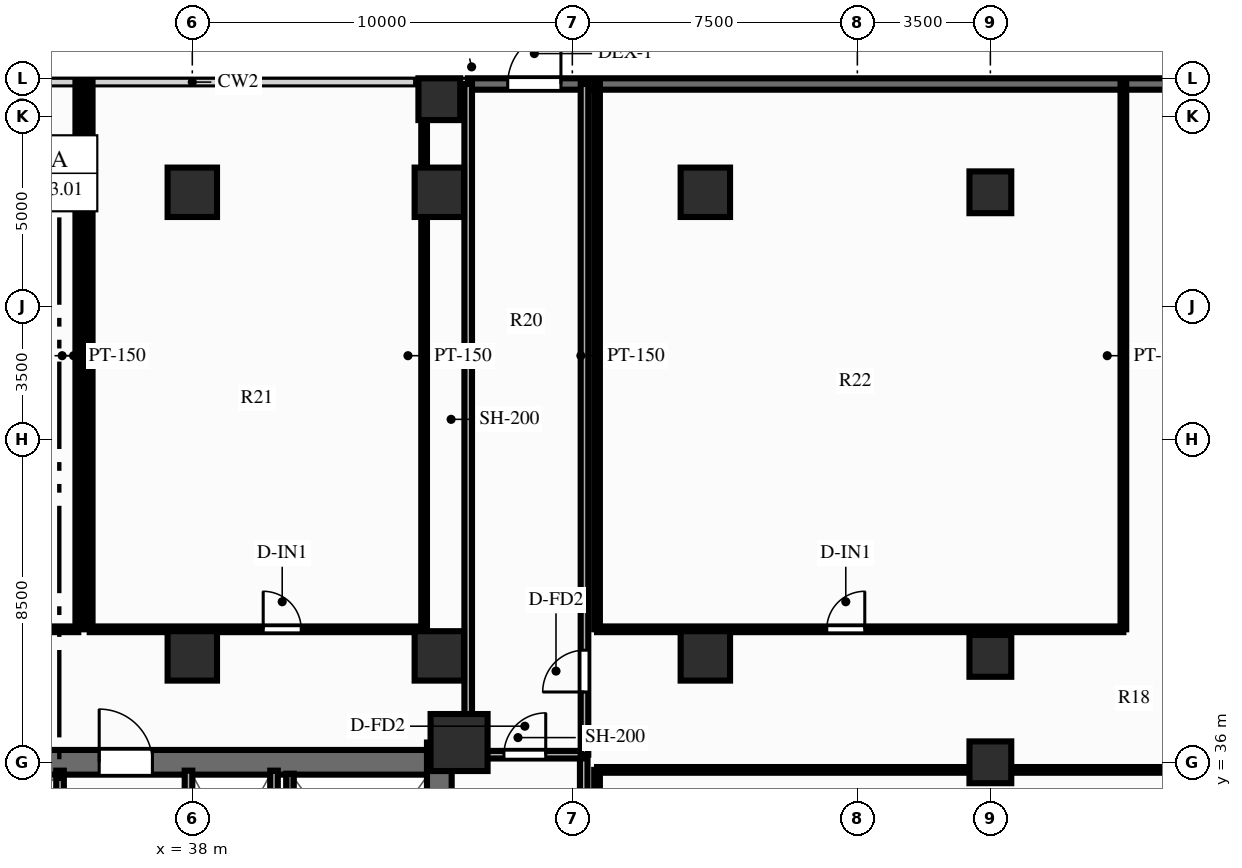
"""IFC4 building model, lengths in metres.
Left out: names, types, materials, properties, quantities, classifications, styles, units other than length and angle.
Written with IfcOpenShell. Run it as: python <this file> out.ifc"""

import sys

from ifc_helpers import new_model, si_unit, direction, frame, frame_2d, origin, origin_2d, place, context, subcontext, project, spatial, rectangle, extrude, source, transform, mapped, element, fill, save


model = new_model("IFC4")
c1 = context("Model", 3, precision=1e-05, world=origin(), true_north=direction((0.0, 1.0)))
c2 = subcontext(c1, "Body", "Model", "MODEL_VIEW")
j1 = project(units=[si_unit("LENGTHUNIT", "METRE"), si_unit("PLANEANGLEUNIT", "RADIAN")], contexts=[c1])
p1 = place(None, origin())
s1 = spatial("IfcSite", under=j1, at=p1, CompositionType="ELEMENT")
p2 = place(p1, origin())
s2 = spatial("IfcBuilding", under=s1, at=p2, CompositionType="ELEMENT")
p3 = place(p2, origin())
s3 = spatial("IfcBuildingStorey", under=s2, at=p3, CompositionType="ELEMENT", Elevation=0.0)
p4 = place(p3, frame((44.5, 17.48, 0.0), z_axis=(0.0, 0.0, 1.0), x_axis=(0.0, 1.0, 0.0)))
e1 = element("IfcWall", 1, at=p4, inside=s3, PredefinedType="SHEAR", context=c2, shape_type="SweptSolid", body=[
    extrude(rectangle(XDim=19.04, YDim=0.65, at=frame_2d((9.52, 0.0))), origin(), (0.0, 0.0, 1.0), 4.2),
])
p5 = place(p4, frame((12.67, 0.0, 0.0), z_axis=(0.0, 0.0, 1.0), x_axis=(-1.0, 0.0, 0.0)))
e2 = element("IfcOpeningElement", 2, at=p5, cuts=e1, PredefinedType="OPENING", context=c2, shape_type="SweptSolid", body=[
    extrude(rectangle(XDim=1.1, YDim=2.15, at=frame_2d((0.55, 1.075))), frame((0.0, 0.337, 0.0), z_axis=(0.0, -1.0, 0.0), x_axis=(1.0, 0.0, 0.0)), (0.0, 0.0, 1.0), 0.674),
])
p6 = place(p3, frame((31.825, 36.0, 0.0), z_axis=(0.0, 0.0, 1.0), x_axis=(1.0, 0.0, 0.0)))
e3 = element("IfcWall", 3, at=p6, inside=s3, PredefinedType="SHEAR", context=c2, shape_type="SweptSolid", body=[
    extrude(rectangle(XDim=12.35, YDim=0.65, at=frame_2d((6.175, 0.0))), origin(), (0.0, 0.0, 1.0), 4.2),
])
p7 = place(p6, frame((5.125, 0.0, 0.0), z_axis=(0.0, 0.0, 1.0), x_axis=(-1.0, 0.0, 0.0)))
e4 = element("IfcOpeningElement", 4, at=p7, cuts=e3, PredefinedType="OPENING", context=c2, shape_type="SweptSolid", body=[
    extrude(rectangle(XDim=1.4, YDim=2.15, at=frame_2d((0.7, 1.075))), frame((0.0, 0.337, 0.0), z_axis=(0.0, -1.0, 0.0), x_axis=(1.0, 0.0, 0.0)), (0.0, 0.0, 1.0), 0.674),
])
m1 = source(origin(), c2, "Body", "SweptSolid", [
    extrude(rectangle(XDim=1.5, YDim=1.5, at=origin_2d()), origin(), (0.0, 0.0, 1.0), 4.2),
])
p8 = place(p3, frame((45.02, 36.52, 0.0), z_axis=(0.0, 0.0, 1.0), x_axis=(1.0, 0.0, 0.0)))
e5 = element("IfcColumn", 5, at=p8, inside=s3, PredefinedType="COLUMN", context=c2, shape_type="MappedRepresentation", body=[
    mapped(m1, transform((0.0, 0.0, 0.0), scale=1.0)),
])
m2 = source(origin(), c2, "Body", "SweptSolid", [
    extrude(rectangle(XDim=1.1, YDim=1.1, at=origin_2d()), origin(), (0.0, 0.0, 1.0), 4.2),
])
for number, where, z_axis, x_axis in (
    (6, (59.0, 36.0, 0.0), (0.0, 0.0, 1.0), (1.0, 0.0, 0.0)),
    (7, (59.0, 38.8, 0.0), (0.0, 0.0, 1.0), (1.0, 0.0, 0.0)),
    (8, (59.0, 51.0, 0.0), (0.0, 0.0, 1.0), (1.0, 0.0, 0.0)),
):
    element("IfcColumn", number, at=place(p3, frame(where, z_axis=z_axis, x_axis=x_axis)), inside=s3, PredefinedType="COLUMN", context=c2, shape_type="MappedRepresentation", body=[
        mapped(m2, transform((0.0, 0.0, 0.0), scale=1.0)),
    ])
m3 = source(origin(), c2, "Body", "SweptSolid", [
    extrude(rectangle(XDim=1.3, YDim=1.3, at=origin_2d()), origin(), (0.0, 0.0, 1.0), 4.2),
])
for number, where, z_axis, x_axis in (
    (9, (38.0, 38.8, 0.0), (0.0, 0.0, 1.0), (1.0, 0.0, 0.0)),
    (10, (38.0, 51.0, 0.0), (0.0, 0.0, 1.0), (1.0, 0.0, 0.0)),
    (11, (44.5, 38.8, 0.0), (0.0, 0.0, 1.0), (1.0, 0.0, 0.0)),
    (12, (44.5, 51.0, 0.0), (0.0, 0.0, 1.0), (1.0, 0.0, 0.0)),
):
    element("IfcColumn", number, at=place(p3, frame(where, z_axis=z_axis, x_axis=x_axis)), inside=s3, PredefinedType="COLUMN", context=c2, shape_type="MappedRepresentation", body=[
        mapped(m3, transform((0.0, 0.0, 0.0), scale=1.0)),
    ])
p9 = place(p3, frame((44.5, 53.45, 0.0), z_axis=(0.0, 0.0, 1.0), x_axis=(1.0, 0.0, 0.0)))
e13 = element("IfcColumn", 13, at=p9, inside=s3, PredefinedType="COLUMN", context=c2, shape_type="MappedRepresentation", body=[
    mapped(m2, transform((0.0, 0.0, 0.0), scale=1.0)),
])
for number, where, z_axis, x_axis in (
    (14, (51.5, 38.8, 0.0), (0.0, 0.0, 1.0), (1.0, 0.0, 0.0)),
    (15, (51.5, 51.0, 0.0), (0.0, 0.0, 1.0), (1.0, 0.0, 0.0)),
):
    element("IfcColumn", number, at=place(p3, frame(where, z_axis=z_axis, x_axis=x_axis)), inside=s3, PredefinedType="COLUMN", context=c2, shape_type="MappedRepresentation", body=[
        mapped(m3, transform((0.0, 0.0, 0.0), scale=1.0)),
    ])
p10 = place(p3, frame((45.25, 53.85, 0.0), z_axis=(0.0, 0.0, 1.0), x_axis=(1.0, 0.0, 0.0)))
e16 = element("IfcWall", 16, at=p10, inside=s3, PredefinedType="SOLIDWALL", context=c2, shape_type="SweptSolid", body=[
    extrude(rectangle(XDim=30.75, YDim=0.3, at=frame_2d((15.375, 0.0))), origin(), (0.0, 0.0, 1.0), 3.48),
])
p11 = place(p10, frame((1.05, 0.0, 0.0)))
e17 = element("IfcOpeningElement", 17, at=p11, cuts=e16, PredefinedType="OPENING", context=c2, shape_type="SweptSolid", body=[
    extrude(rectangle(XDim=1.4, YDim=2.2, at=frame_2d((0.7, 1.1))), frame((0.0, 0.162, 0.0), z_axis=(0.0, -1.0, 0.0), x_axis=(1.0, 0.0, 0.0)), (0.0, 0.0, 1.0), 0.324),
])
p12 = place(p3, frame((40.15, 31.8, 0.0), z_axis=(0.0, 0.0, 1.0), x_axis=(0.0, 1.0, 0.0)))
e18 = element("IfcWall", 18, at=p12, inside=s3, PredefinedType="PARTITIONING", context=c2, shape_type="SweptSolid", body=[
    extrude(rectangle(XDim=3.98, YDim=0.2, at=frame_2d((1.99, 0.0))), origin(), (0.0, 0.0, 1.0), 3.92),
])
p13 = place(p3, frame((40.57, 28.65, 0.0), z_axis=(0.0, 0.0, 1.0), x_axis=(0.0, 1.0, 0.0)))
e19 = element("IfcWall", 19, at=p13, inside=s3, PredefinedType="SOLIDWALL", context=c2, shape_type="SweptSolid", body=[
    extrude(rectangle(XDim=7.05, YDim=0.2, at=frame_2d((3.525, 0.0))), origin(), (0.0, 0.0, 1.0), 3.92),
])
p14 = place(p3, frame((34.52, 25.44, 0.0), z_axis=(0.0, 0.0, 1.0), x_axis=(0.0, 1.0, 0.0)))
e20 = element("IfcWall", 20, at=p14, inside=s3, PredefinedType="PARTITIONING", context=c2, shape_type="SweptSolid", body=[
    extrude(rectangle(XDim=10.34, YDim=0.2, at=frame_2d((5.17, 0.0))), origin(), (0.0, 0.0, 1.0), 3.92),
])
p15 = place(p14, frame((0.32, 0.0, 0.0)))
e21 = element("IfcOpeningElement", 21, at=p15, cuts=e20, PredefinedType="OPENING", context=c2, shape_type="SweptSolid", body=[
    extrude(rectangle(XDim=1.0, YDim=2.15, at=frame_2d((0.5, 1.075))), frame((0.0, 0.112, 0.0), z_axis=(0.0, -1.0, 0.0), x_axis=(1.0, 0.0, 0.0)), (0.0, 0.0, 1.0), 0.224),
])
p16 = place(p14, frame((1.71, 0.0, 0.0)))
e22 = element("IfcOpeningElement", 22, at=p16, cuts=e20, PredefinedType="OPENING", context=c2, shape_type="SweptSolid", body=[
    extrude(rectangle(XDim=1.0, YDim=2.15, at=frame_2d((0.5, 1.075))), frame((0.0, 0.112, 0.0), z_axis=(0.0, -1.0, 0.0), x_axis=(1.0, 0.0, 0.0)), (0.0, 0.0, 1.0), 0.224),
])
p17 = place(p14, frame((3.535, 0.0, 0.0)))
e23 = element("IfcOpeningElement", 23, at=p17, cuts=e20, PredefinedType="OPENING", context=c2, shape_type="SweptSolid", body=[
    extrude(rectangle(XDim=1.0, YDim=2.15, at=frame_2d((0.5, 1.075))), frame((0.0, 0.112, 0.0), z_axis=(0.0, -1.0, 0.0), x_axis=(1.0, 0.0, 0.0)), (0.0, 0.0, 1.0), 0.224),
])
p18 = place(p14, frame((5.135, 0.0, 0.0)))
e24 = element("IfcOpeningElement", 24, at=p18, cuts=e20, PredefinedType="OPENING", context=c2, shape_type="SweptSolid", body=[
    extrude(rectangle(XDim=1.0, YDim=2.15, at=frame_2d((0.5, 1.075))), frame((0.0, 0.112, 0.0), z_axis=(0.0, -1.0, 0.0), x_axis=(1.0, 0.0, 0.0)), (0.0, 0.0, 1.0), 0.224),
])
p19 = place(p14, frame((7.01, 0.0, 0.0)))
e25 = element("IfcOpeningElement", 25, at=p19, cuts=e20, PredefinedType="OPENING", context=c2, shape_type="SweptSolid", body=[
    extrude(rectangle(XDim=1.0, YDim=2.15, at=frame_2d((0.5, 1.075))), frame((0.0, 0.112, 0.0), z_axis=(0.0, -1.0, 0.0), x_axis=(1.0, 0.0, 0.0)), (0.0, 0.0, 1.0), 0.224),
])
p20 = place(p14, frame((8.76, 0.0, 0.0)))
e26 = element("IfcOpeningElement", 26, at=p20, cuts=e20, PredefinedType="OPENING", context=c2, shape_type="SweptSolid", body=[
    extrude(rectangle(XDim=1.0, YDim=2.15, at=frame_2d((0.5, 1.075))), frame((0.0, 0.112, 0.0), z_axis=(0.0, -1.0, 0.0), x_axis=(1.0, 0.0, 0.0)), (0.0, 0.0, 1.0), 0.224),
])
p21 = place(p3, frame((37.9, 25.44, 0.0), z_axis=(0.0, 0.0, 1.0), x_axis=(0.0, 1.0, 0.0)))
e27 = element("IfcWall", 27, at=p21, inside=s3, PredefinedType="PARTITIONING", context=c2, shape_type="SweptSolid", body=[
    extrude(rectangle(XDim=10.34, YDim=0.2, at=frame_2d((5.17, 0.0))), origin(), (0.0, 0.0, 1.0), 3.92),
])
p22 = place(p21, frame((0.32, 0.0, 0.0)))
e28 = element("IfcOpeningElement", 28, at=p22, cuts=e27, PredefinedType="OPENING", context=c2, shape_type="SweptSolid", body=[
    extrude(rectangle(XDim=1.0, YDim=2.15, at=frame_2d((0.5, 1.075))), frame((0.0, 0.112, 0.0), z_axis=(0.0, -1.0, 0.0), x_axis=(1.0, 0.0, 0.0)), (0.0, 0.0, 1.0), 0.224),
])
p23 = place(p21, frame((1.71, 0.0, 0.0)))
e29 = element("IfcOpeningElement", 29, at=p23, cuts=e27, PredefinedType="OPENING", context=c2, shape_type="SweptSolid", body=[
    extrude(rectangle(XDim=1.0, YDim=2.15, at=frame_2d((0.5, 1.075))), frame((0.0, 0.112, 0.0), z_axis=(0.0, -1.0, 0.0), x_axis=(1.0, 0.0, 0.0)), (0.0, 0.0, 1.0), 0.224),
])
p24 = place(p21, frame((3.51, 0.0, 0.0)))
e30 = element("IfcOpeningElement", 30, at=p24, cuts=e27, PredefinedType="OPENING", context=c2, shape_type="SweptSolid", body=[
    extrude(rectangle(XDim=1.0, YDim=2.15, at=frame_2d((0.5, 1.075))), frame((0.0, 0.112, 0.0), z_axis=(0.0, -1.0, 0.0), x_axis=(1.0, 0.0, 0.0)), (0.0, 0.0, 1.0), 0.224),
])
p25 = place(p21, frame((5.01, 0.0, 0.0)))
e31 = element("IfcOpeningElement", 31, at=p25, cuts=e27, PredefinedType="OPENING", context=c2, shape_type="SweptSolid", body=[
    extrude(rectangle(XDim=1.0, YDim=2.15, at=frame_2d((0.5, 1.075))), frame((0.0, 0.112, 0.0), z_axis=(0.0, -1.0, 0.0), x_axis=(1.0, 0.0, 0.0)), (0.0, 0.0, 1.0), 0.224),
])
p26 = place(p21, frame((6.86, 0.0, 0.0)))
e32 = element("IfcOpeningElement", 32, at=p26, cuts=e27, PredefinedType="OPENING", context=c2, shape_type="SweptSolid", body=[
    extrude(rectangle(XDim=1.0, YDim=2.15, at=frame_2d((0.5, 1.075))), frame((0.0, 0.112, 0.0), z_axis=(0.0, -1.0, 0.0), x_axis=(1.0, 0.0, 0.0)), (0.0, 0.0, 1.0), 0.224),
])
p27 = place(p21, frame((8.71, 0.0, 0.0)))
e33 = element("IfcOpeningElement", 33, at=p27, cuts=e27, PredefinedType="OPENING", context=c2, shape_type="SweptSolid", body=[
    extrude(rectangle(XDim=1.0, YDim=2.15, at=frame_2d((0.5, 1.075))), frame((0.0, 0.112, 0.0), z_axis=(0.0, -1.0, 0.0), x_axis=(1.0, 0.0, 0.0)), (0.0, 0.0, 1.0), 0.224),
])
p28 = place(p3, frame((48.3, 28.35, 0.0), z_axis=(0.0, 0.0, 1.0), x_axis=(0.0, 1.0, 0.0)))
e34 = element("IfcWall", 34, at=p28, inside=s3, PredefinedType="PARTITIONING", context=c2, shape_type="SweptSolid", body=[
    extrude(rectangle(XDim=7.85, YDim=0.2, at=frame_2d((3.925, 0.0))), origin(), (0.0, 0.0, 1.0), 3.92),
])
p29 = place(p3, frame((44.84, 36.2, 0.0), z_axis=(0.0, 0.0, 1.0), x_axis=(1.0, 0.0, 0.0)))
e35 = element("IfcWall", 35, at=p29, inside=s3, PredefinedType="PARTITIONING", context=c2, shape_type="SweptSolid", body=[
    extrude(rectangle(XDim=3.46, YDim=0.2, at=frame_2d((1.73, 0.0))), origin(), (0.0, 0.0, 1.0), 3.29),
])
p30 = place(p29, frame((1.36, 0.0, 0.0)))
e36 = element("IfcOpeningElement", 36, at=p30, cuts=e35, PredefinedType="OPENING", context=c2, shape_type="SweptSolid", body=[
    extrude(rectangle(XDim=1.1, YDim=2.15, at=frame_2d((0.55, 1.075))), frame((0.0, 0.112, 0.0), z_axis=(0.0, -1.0, 0.0), x_axis=(1.0, 0.0, 0.0)), (0.0, 0.0, 1.0), 0.224),
])
p31 = place(p3, frame((45.26, 36.2, 0.0), z_axis=(0.0, 0.0, 1.0), x_axis=(0.0, 1.0, 0.0)))
e37 = element("IfcWall", 37, at=p31, inside=s3, PredefinedType="PARTITIONING", context=c2, shape_type="SweptSolid", body=[
    extrude(rectangle(XDim=17.65, YDim=0.2, at=frame_2d((8.825, 0.0))), origin(), (0.0, 0.0, 1.0), 3.44),
])
p32 = place(p3, frame((48.32, 36.2, 0.0), z_axis=(0.0, 0.0, 1.0), x_axis=(0.0, 1.0, 0.0)))
e38 = element("IfcWall", 38, at=p32, inside=s3, PredefinedType="PARTITIONING", context=c2, shape_type="SweptSolid", body=[
    extrude(rectangle(XDim=17.65, YDim=0.2, at=frame_2d((8.825, 0.0))), origin(), (0.0, 0.0, 1.0), 3.92),
])
p33 = place(p32, frame((1.65, 0.0, 0.0)))
e39 = element("IfcOpeningElement", 39, at=p33, cuts=e38, PredefinedType="OPENING", context=c2, shape_type="SweptSolid", body=[
    extrude(rectangle(XDim=1.1, YDim=2.15, at=frame_2d((0.55, 1.075))), frame((0.0, 0.112, 0.0), z_axis=(0.0, -1.0, 0.0), x_axis=(1.0, 0.0, 0.0)), (0.0, 0.0, 1.0), 0.224),
])
p34 = place(p3, frame((11.6, 39.5, 0.0), z_axis=(0.0, 0.0, 1.0), x_axis=(1.0, 0.0, 0.0)))
e40 = element("IfcWall", 40, at=p34, inside=s3, PredefinedType="PARTITIONING", context=c2, shape_type="SweptSolid", body=[
    extrude(rectangle(XDim=23.4, YDim=0.15, at=frame_2d((11.7, 0.0))), origin(), (0.0, 0.0, 1.0), 3.92),
])
p35 = place(p34, frame((9.844, 0.0, 0.0)))
e41 = element("IfcOpeningElement", 41, at=p35, cuts=e40, PredefinedType="OPENING", context=c2, shape_type="SweptSolid", body=[
    extrude(rectangle(XDim=1.0, YDim=2.15, at=frame_2d((0.5, 1.075))), frame((0.0, 0.087, 0.0), z_axis=(0.0, -1.0, 0.0), x_axis=(1.0, 0.0, 0.0)), (0.0, 0.0, 1.0), 0.174),
])
p36 = place(p3, frame((35.0, 39.5, 0.0), z_axis=(0.0, 0.0, 1.0), x_axis=(0.0, 1.0, 0.0)))
e42 = element("IfcWall", 42, at=p36, inside=s3, PredefinedType="PARTITIONING", context=c2, shape_type="SweptSolid", body=[
    extrude(rectangle(XDim=14.4, YDim=0.15, at=frame_2d((7.2, 0.0))), origin(), (0.0, 0.0, 1.0), 3.92),
])
p37 = place(p3, frame((35.3, 39.5, 0.0), z_axis=(0.0, 0.0, 1.0), x_axis=(1.0, 0.0, 0.0)))
e43 = element("IfcWall", 43, at=p37, inside=s3, PredefinedType="PARTITIONING", context=c2, shape_type="SweptSolid", body=[
    extrude(rectangle(XDim=8.8, YDim=0.15, at=frame_2d((4.4, 0.0))), origin(), (0.0, 0.0, 1.0), 3.92),
])
p38 = place(p37, frame((4.566, 0.0, 0.0)))
e44 = element("IfcOpeningElement", 44, at=p38, cuts=e43, PredefinedType="OPENING", context=c2, shape_type="SweptSolid", body=[
    extrude(rectangle(XDim=1.0, YDim=2.1, at=frame_2d((0.5, 1.05))), frame((0.0, 0.087, 0.0), z_axis=(0.0, -1.0, 0.0), x_axis=(1.0, 0.0, 0.0)), (0.0, 0.0, 1.0), 0.174),
])
for number, where, z_axis, x_axis in (
    (45, (35.3, 39.5, 0.0), (0.0, 0.0, 1.0), (0.0, 1.0, 0.0)),
    (46, (44.1, 39.5, 0.0), (0.0, 0.0, 1.0), (0.0, 1.0, 0.0)),
):
    element("IfcWall", number, at=place(p3, frame(where, z_axis=z_axis, x_axis=x_axis)), inside=s3, PredefinedType="PARTITIONING", context=c2, shape_type="SweptSolid", body=[
        extrude(rectangle(XDim=14.4, YDim=0.15, at=frame_2d((7.2, 0.0))), origin(), (0.0, 0.0, 1.0), 3.92),
    ])
p39 = place(p3, frame((48.65, 39.5, 0.0), z_axis=(0.0, 0.0, 1.0), x_axis=(1.0, 0.0, 0.0)))
e47 = element("IfcWall", 47, at=p39, inside=s3, PredefinedType="PARTITIONING", context=c2, shape_type="SweptSolid", body=[
    extrude(rectangle(XDim=13.85, YDim=0.15, at=frame_2d((6.925, 0.0))), origin(), (0.0, 0.0, 1.0), 3.92),
])
p40 = place(p39, frame((6.045, 0.0, 0.0)))
e48 = element("IfcOpeningElement", 48, at=p40, cuts=e47, PredefinedType="OPENING", context=c2, shape_type="SweptSolid", body=[
    extrude(rectangle(XDim=1.0, YDim=2.1, at=frame_2d((0.5, 1.05))), frame((0.0, 0.087, 0.0), z_axis=(0.0, -1.0, 0.0), x_axis=(1.0, 0.0, 0.0)), (0.0, 0.0, 1.0), 0.174),
])
for number, where, z_axis, x_axis in (
    (49, (48.65, 39.5, 0.0), (0.0, 0.0, 1.0), (0.0, 1.0, 0.0)),
    (50, (62.5, 39.5, 0.0), (0.0, 0.0, 1.0), (0.0, 1.0, 0.0)),
):
    element("IfcWall", number, at=place(p3, frame(where, z_axis=z_axis, x_axis=x_axis)), inside=s3, PredefinedType="PARTITIONING", context=c2, shape_type="SweptSolid", body=[
        extrude(rectangle(XDim=14.4, YDim=0.15, at=frame_2d((7.2, 0.0))), origin(), (0.0, 0.0, 1.0), 3.92),
    ])
p41 = place(p3, frame((48.65, 35.8, 0.0), z_axis=(0.0, 0.0, 1.0), x_axis=(1.0, 0.0, 0.0)))
e51 = element("IfcWall", 51, at=p41, inside=s3, PredefinedType="PARTITIONING", context=c2, shape_type="SweptSolid", body=[
    extrude(rectangle(XDim=15.25, YDim=0.15, at=frame_2d((7.625, 0.0))), origin(), (0.0, 0.0, 1.0), 3.92),
])
p42 = place(p3, frame((48.65, 25.4, 0.0), z_axis=(0.0, 0.0, 1.0), x_axis=(0.0, 1.0, 0.0)))
e52 = element("IfcWall", 52, at=p42, inside=s3, PredefinedType="PARTITIONING", context=c2, shape_type="SweptSolid", body=[
    extrude(rectangle(XDim=10.4, YDim=0.15, at=frame_2d((5.2, 0.0))), origin(), (0.0, 0.0, 1.0), 3.92),
])
m4 = source(origin(), c2, "Body", "SweptSolid", [
    extrude(rectangle(XDim=1.4, YDim=2.2, at=frame_2d((0.7, 1.1))), frame((0.0, 0.025, 0.0), z_axis=(0.0, -1.0, 0.0), x_axis=(1.0, 0.0, 0.0)), (0.0, 0.0, 1.0), 0.05),
])
p43 = place(p11, origin())
e53 = element("IfcDoor", 53, at=p43, inside=s3, OperationType="SINGLE_SWING_RIGHT", PredefinedType="DOOR", context=c2, shape_type="MappedRepresentation", body=[
    mapped(m4, transform((0.0, 0.0, 0.0), scale=1.0)),
])
fill(e17, e53)
m5 = source(origin(), c2, "Body", "SweptSolid", [
    extrude(rectangle(XDim=1.4, YDim=2.15, at=frame_2d((0.7, 1.075))), frame((0.0, 0.025, 0.0), z_axis=(0.0, -1.0, 0.0), x_axis=(1.0, 0.0, 0.0)), (0.0, 0.0, 1.0), 0.05),
])
p44 = place(p7, origin())
e54 = element("IfcDoor", 54, at=p44, inside=s3, OperationType="SINGLE_SWING_RIGHT", PredefinedType="DOOR", context=c2, shape_type="MappedRepresentation", body=[
    mapped(m5, transform((0.0, 0.0, 0.0), scale=1.0)),
])
fill(e4, e54)
m6 = source(origin(), c2, "Body", "SweptSolid", [
    extrude(rectangle(XDim=1.1, YDim=2.15, at=frame_2d((0.55, 1.075))), frame((0.0, 0.025, 0.0), z_axis=(0.0, -1.0, 0.0), x_axis=(1.0, 0.0, 0.0)), (0.0, 0.0, 1.0), 0.05),
])
p45 = place(p30, origin())
e55 = element("IfcDoor", 55, at=p45, inside=s3, OperationType="SINGLE_SWING_RIGHT", PredefinedType="DOOR", context=c2, shape_type="MappedRepresentation", body=[
    mapped(m6, transform((0.0, 0.0, 0.0), scale=1.0)),
])
fill(e36, e55)
p46 = place(p33, origin())
e56 = element("IfcDoor", 56, at=p46, inside=s3, OperationType="SINGLE_SWING_LEFT", PredefinedType="DOOR", context=c2, shape_type="MappedRepresentation", body=[
    mapped(m6, transform((0.0, 0.0, 0.0), scale=1.0)),
])
fill(e39, e56)
m7 = source(origin(), c2, "Body", "SweptSolid", [
    extrude(rectangle(XDim=1.0, YDim=2.1, at=frame_2d((0.5, 1.05))), frame((0.0, 0.025, 0.0), z_axis=(0.0, -1.0, 0.0), x_axis=(1.0, 0.0, 0.0)), (0.0, 0.0, 1.0), 0.05),
])
p47 = place(p38, origin())
e57 = element("IfcDoor", 57, at=p47, inside=s3, OperationType="SINGLE_SWING_LEFT", PredefinedType="DOOR", context=c2, shape_type="MappedRepresentation", body=[
    mapped(m7, transform((0.0, 0.0, 0.0), scale=1.0)),
])
fill(e44, e57)
p48 = place(p40, origin())
e58 = element("IfcDoor", 58, at=p48, inside=s3, OperationType="SINGLE_SWING_RIGHT", PredefinedType="DOOR", context=c2, shape_type="MappedRepresentation", body=[
    mapped(m7, transform((0.0, 0.0, 0.0), scale=1.0)),
])
fill(e48, e58)
save(model, sys.argv[1])
